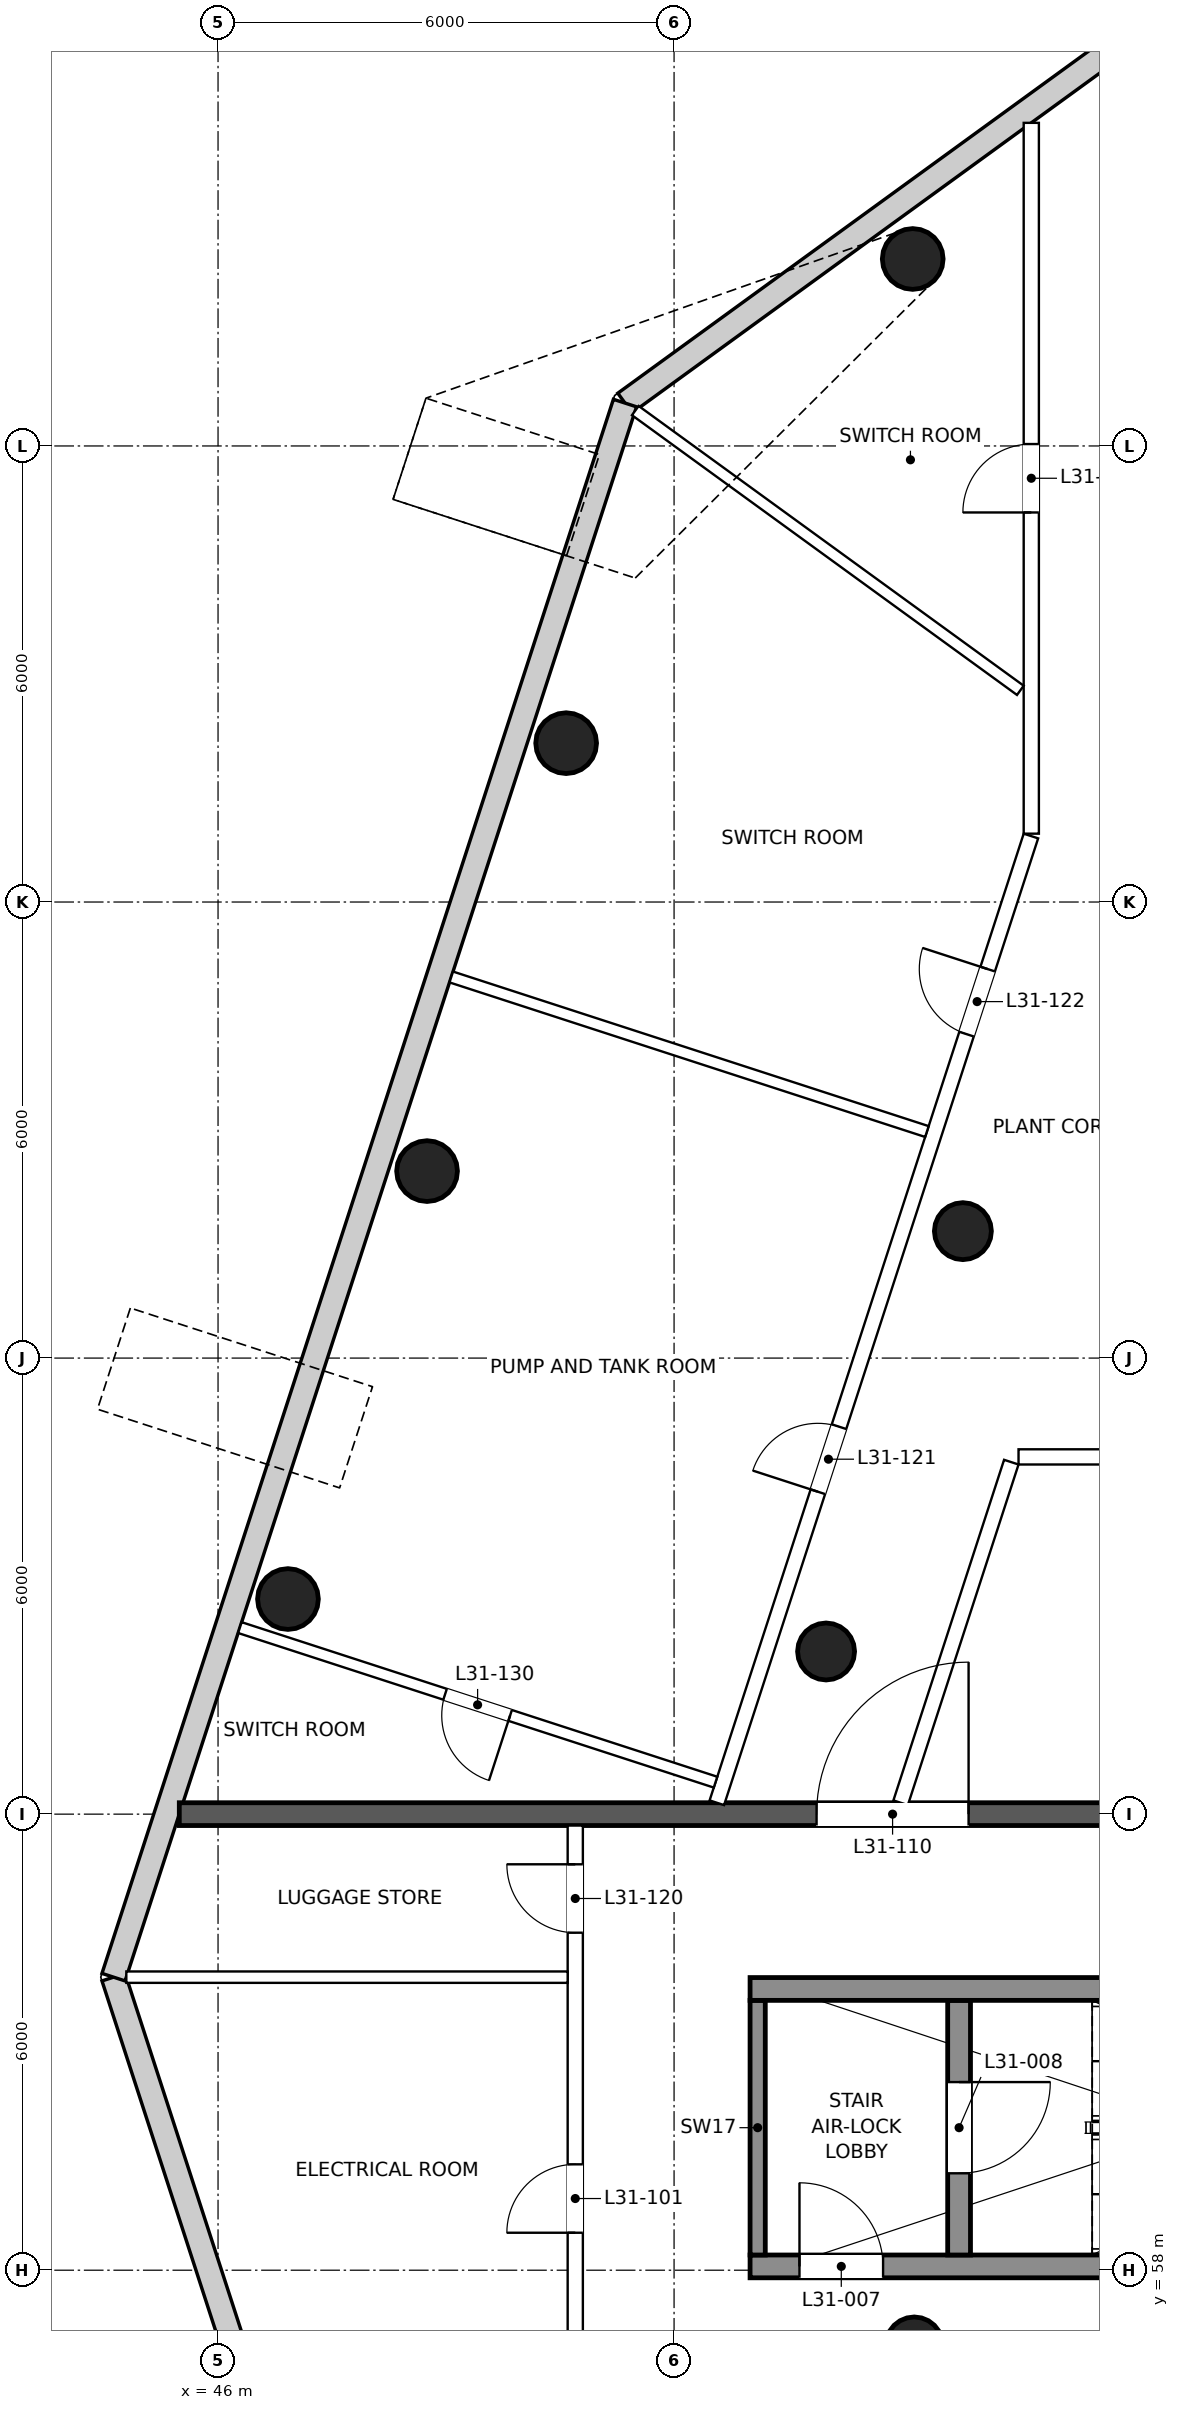
"""IFC4 building model, lengths in metres.
Left out: names, types, materials, properties, quantities, classifications, styles, units other than length and angle.
Written with IfcOpenShell. Run it as: python <this file> out.ifc"""

import sys

from ifc_helpers import new_model, si_unit, direction, frame, frame_2d, origin, origin_2d, place, context, subcontext, project, spatial, rectangle, circle, extrude, element, fill, save


model = new_model("IFC4")
c1 = context("Model", 3, precision=1e-05, world=origin(), true_north=direction((0.0, 1.0)))
c2 = subcontext(c1, "Body", "Model", "MODEL_VIEW")
j1 = project(units=[si_unit("LENGTHUNIT", "METRE"), si_unit("PLANEANGLEUNIT", "RADIAN")], contexts=[c1])
p1 = place(None, origin())
s1 = spatial("IfcSite", under=j1, at=p1, CompositionType="ELEMENT")
p2 = place(p1, origin())
s2 = spatial("IfcBuilding", under=s1, at=p2, CompositionType="ELEMENT")
p3 = place(p2, frame((0.0, 0.0, 137.6)))
s3 = spatial("IfcBuildingStorey", under=s2, at=p3, CompositionType="ELEMENT", Elevation=137.6)
for number, where, z_axis, x_axis in (
    (1, (55.14, 84.46, 0.0), (0.0, 0.0, 1.0), (1.0, 0.0, 0.0)),
    (2, (50.58, 78.09, 0.0), (0.0, 0.0, 1.0), (1.0, 0.0, 0.0)),
    (3, (48.75, 72.46, 0.0), (0.0, 0.0, 1.0), (1.0, 0.0, 0.0)),
    (4, (46.92, 66.83, 0.0), (0.0, 0.0, 1.0), (1.0, 0.0, 0.0)),
):
    element("IfcColumn", number, at=place(p3, frame(where, z_axis=z_axis, x_axis=x_axis)), inside=s3, PredefinedType="COLUMN", context=c2, shape_type="SweptSolid", body=[
        extrude(circle(Radius=0.4, at=origin_2d()), origin(), (0.0, 0.0, 1.0), 5.0),
    ])
for number, where, z_axis, x_axis in (
    (5, (55.16, 57.01, 0.0), (0.0, 0.0, 1.0), (1.0, 0.0, 0.0)),
    (6, (55.8, 71.67, 0.0), (0.0, 0.0, 1.0), (1.0, 0.0, 0.0)),
    (7, (54.0, 66.14, 0.0), (0.0, 0.0, 1.0), (1.0, 0.0, 0.0)),
):
    element("IfcColumn", number, at=place(p3, frame(where, z_axis=z_axis, x_axis=x_axis)), inside=s3, PredefinedType="COLUMN", context=c2, shape_type="SweptSolid", body=[
        extrude(circle(Radius=0.375, at=origin_2d()), origin(), (0.0, 0.0, 1.0), 5.0),
    ])
p4 = place(p3, frame((44.625, 61.855, 0.0), z_axis=(0.0, 0.0, 1.0), x_axis=(0.309020152218, -0.951055490244, 0.0)))
e8 = element("IfcWall", 8, at=p4, inside=s3, PredefinedType="SOLIDWALL", context=c2, shape_type="SweptSolid", body=[
    extrude(rectangle(XDim=8.709, YDim=0.32, at=frame_2d((4.355, 0.0))), origin(), (0.0, 0.0, 1.0), 4.6),
])
p5 = place(p3, frame((58.615, 87.84, 0.0), z_axis=(0.0, 0.0, 1.0), x_axis=(-0.809005369707, -0.587801251942, 0.0)))
e9 = element("IfcWall", 9, at=p5, inside=s3, PredefinedType="SOLIDWALL", context=c2, shape_type="SweptSolid", body=[
    extrude(rectangle(XDim=8.975, YDim=0.32, at=frame_2d((4.488, 0.0))), origin(), (0.0, 0.0, 1.0), 4.6),
])
p6 = place(p3, frame((51.354, 82.564, 0.0), z_axis=(0.0, 0.0, 1.0), x_axis=(-0.309023959084, -0.951054253296, 0.0)))
e10 = element("IfcWall", 10, at=p6, inside=s3, PredefinedType="SOLIDWALL", context=c2, shape_type="SweptSolid", body=[
    extrude(rectangle(XDim=21.775, YDim=0.32, at=frame_2d((10.887, 0.0))), origin(), (0.0, 0.0, 1.0), 4.6),
])
p7 = place(p3, frame((53.0, 58.05, 0.0), z_axis=(0.0, 0.0, 1.0), x_axis=(1.0, 0.0, 0.0)))
e11 = element("IfcWall", 11, at=p7, inside=s3, PredefinedType="SHEAR", context=c2, shape_type="SweptSolid", body=[
    extrude(rectangle(XDim=11.9, YDim=0.3, at=frame_2d((5.95, 0.0))), origin(), (0.0, 0.0, 1.0), 5.0),
])
p8 = place(p7, frame((0.65, 0.0, 0.0)))
e12 = element("IfcOpeningElement", 12, at=p8, cuts=e11, PredefinedType="OPENING", context=c2, shape_type="SweptSolid", body=[
    extrude(rectangle(XDim=1.1, YDim=2.1, at=frame_2d((0.55, 1.05))), frame((0.0, 0.16, 0.0), z_axis=(0.0, -1.0, 0.0), x_axis=(1.0, 0.0, 0.0)), (0.0, 0.0, 1.0), 0.32),
])
p9 = place(p3, frame((53.1, 58.2, 0.0), z_axis=(0.0, 0.0, 1.0), x_axis=(0.0, 1.0, 0.0)))
e13 = element("IfcWall", 13, at=p9, inside=s3, PredefinedType="SHEAR", context=c2, shape_type="SweptSolid", body=[
    extrude(rectangle(XDim=3.35, YDim=0.2, at=frame_2d((1.675, 0.0))), origin(), (0.0, 0.0, 1.0), 5.0),
])
p10 = place(p3, frame((55.75, 58.2, 0.0), z_axis=(0.0, 0.0, 1.0), x_axis=(0.0, 1.0, 0.0)))
e14 = element("IfcWall", 14, at=p10, inside=s3, PredefinedType="SHEAR", context=c2, shape_type="SweptSolid", body=[
    extrude(rectangle(XDim=3.35, YDim=0.3, at=frame_2d((1.675, 0.0))), origin(), (0.0, 0.0, 1.0), 5.0),
])
p11 = place(p10, frame((1.075, 0.0, 0.0)))
e15 = element("IfcOpeningElement", 15, at=p11, cuts=e14, PredefinedType="OPENING", context=c2, shape_type="SweptSolid", body=[
    extrude(rectangle(XDim=1.2, YDim=2.1, at=frame_2d((0.6, 1.05))), frame((0.0, 0.16, 0.0), z_axis=(0.0, -1.0, 0.0), x_axis=(1.0, 0.0, 0.0)), (0.0, 0.0, 1.0), 0.32),
])
p12 = place(p3, frame((53.0, 61.7, 0.0), z_axis=(0.0, 0.0, 1.0), x_axis=(1.0, 0.0, 0.0)))
e16 = element("IfcWall", 16, at=p12, inside=s3, PredefinedType="SHEAR", context=c2, shape_type="SweptSolid", body=[
    extrude(rectangle(XDim=11.9, YDim=0.3, at=frame_2d((5.95, 0.0))), origin(), (0.0, 0.0, 1.0), 5.0),
])
p13 = place(p3, frame((45.49, 64.0, 0.0), z_axis=(0.0, 0.0, 1.0), x_axis=(1.0, 0.0, 0.0)))
e17 = element("IfcWall", 17, at=p13, inside=s3, PredefinedType="PARTITIONING", context=c2, shape_type="SweptSolid", body=[
    extrude(rectangle(XDim=49.02, YDim=0.3, at=frame_2d((24.51, 0.0))), origin(), (0.0, 0.0, 1.0), 3.9),
])
p14 = place(p13, frame((8.385, 0.0, 0.0)))
e18 = element("IfcOpeningElement", 18, at=p14, cuts=e17, PredefinedType="OPENING", context=c2, shape_type="SweptSolid", body=[
    extrude(rectangle(XDim=2.0, YDim=2.1, at=frame_2d((1.0, 1.05))), frame((0.0, 0.16, 0.0), z_axis=(0.0, -1.0, 0.0), x_axis=(1.0, 0.0, 0.0)), (0.0, 0.0, 1.0), 0.32),
])
p15 = place(p13, frame((16.535, 0.0, 0.0)))
e19 = element("IfcOpeningElement", 19, at=p15, cuts=e17, PredefinedType="OPENING", context=c2, shape_type="SweptSolid", body=[
    extrude(rectangle(XDim=2.0, YDim=2.1, at=frame_2d((1.0, 1.05))), frame((0.0, 0.16, 0.0), z_axis=(0.0, -1.0, 0.0), x_axis=(1.0, 0.0, 0.0)), (0.0, 0.0, 1.0), 0.32),
])
p16 = place(p13, frame((23.91, 0.0, 0.0)))
e20 = element("IfcOpeningElement", 20, at=p16, cuts=e17, PredefinedType="OPENING", context=c2, shape_type="SweptSolid", body=[
    extrude(rectangle(XDim=1.2, YDim=2.1, at=frame_2d((0.6, 1.05))), frame((0.0, 0.16, 0.0), z_axis=(0.0, -1.0, 0.0), x_axis=(1.0, 0.0, 0.0)), (0.0, 0.0, 1.0), 0.32),
])
p17 = place(p13, frame((30.435, 0.0, 0.0)))
e21 = element("IfcOpeningElement", 21, at=p17, cuts=e17, PredefinedType="OPENING", context=c2, shape_type="SweptSolid", body=[
    extrude(rectangle(XDim=2.0, YDim=2.1, at=frame_2d((1.0, 1.05))), frame((0.0, 0.16, 0.0), z_axis=(0.0, -1.0, 0.0), x_axis=(1.0, 0.0, 0.0)), (0.0, 0.0, 1.0), 0.32),
])
p18 = place(p13, frame((38.635, 0.0, 0.0)))
e22 = element("IfcOpeningElement", 22, at=p18, cuts=e17, PredefinedType="OPENING", context=c2, shape_type="SweptSolid", body=[
    extrude(rectangle(XDim=2.0, YDim=2.1, at=frame_2d((1.0, 1.05))), frame((0.0, 0.16, 0.0), z_axis=(0.0, -1.0, 0.0), x_axis=(1.0, 0.0, 0.0)), (0.0, 0.0, 1.0), 0.32),
])
p19 = place(p3, frame((52.563, 64.15, 0.0), z_axis=(0.0, 0.0, 1.0), x_axis=(0.309005574406, 0.951060226792, 0.0)))
e23 = element("IfcWall", 23, at=p19, inside=s3, PredefinedType="PARTITIONING", context=c2, shape_type="SweptSolid", body=[
    extrude(rectangle(XDim=13.373, YDim=0.2, at=frame_2d((6.687, 0.0))), origin(), (0.0, 0.0, 1.0), 4.6),
])
p20 = place(p19, frame((4.302, 0.0, 0.0)))
e24 = element("IfcOpeningElement", 24, at=p20, cuts=e23, PredefinedType="OPENING", context=c2, shape_type="SweptSolid", body=[
    extrude(rectangle(XDim=0.9, YDim=2.1, at=frame_2d((0.45, 1.05))), frame((0.0, 0.11, 0.0), z_axis=(0.0, -1.0, 0.0), x_axis=(1.0, 0.0, 0.0)), (0.0, 0.0, 1.0), 0.22),
])
p21 = place(p19, frame((10.632, 0.0, 0.0)))
e25 = element("IfcOpeningElement", 25, at=p21, cuts=e23, PredefinedType="OPENING", context=c2, shape_type="SweptSolid", body=[
    extrude(rectangle(XDim=0.9, YDim=2.1, at=frame_2d((0.45, 1.05))), frame((0.0, 0.11, 0.0), z_axis=(0.0, -1.0, 0.0), x_axis=(1.0, 0.0, 0.0)), (0.0, 0.0, 1.0), 0.22),
])
p22 = place(p3, frame((56.7, 76.899, 0.0), z_axis=(0.0, 0.0, 1.0), x_axis=(0.0, 1.0, 0.0)))
e26 = element("IfcWall", 26, at=p22, inside=s3, PredefinedType="PARTITIONING", context=c2, shape_type="SweptSolid", body=[
    extrude(rectangle(XDim=9.352, YDim=0.2, at=frame_2d((4.676, 0.0))), origin(), (0.0, 0.0, 1.0), 4.15),
])
p23 = place(p22, frame((4.226, 0.0, 0.0)))
e27 = element("IfcOpeningElement", 27, at=p23, cuts=e26, PredefinedType="OPENING", context=c2, shape_type="SweptSolid", body=[
    extrude(rectangle(XDim=0.9, YDim=2.1, at=frame_2d((0.45, 1.05))), frame((0.0, 0.11, 0.0), z_axis=(0.0, -1.0, 0.0), x_axis=(1.0, 0.0, 0.0)), (0.0, 0.0, 1.0), 0.22),
])
p24 = place(p3, frame((50.7, 55.7, 0.0), z_axis=(0.0, 0.0, 1.0), x_axis=(0.0, 1.0, 0.0)))
e28 = element("IfcWall", 28, at=p24, inside=s3, PredefinedType="PARTITIONING", context=c2, shape_type="SweptSolid", body=[
    extrude(rectangle(XDim=8.15, YDim=0.2, at=frame_2d((4.075, 0.0))), origin(), (0.0, 0.0, 1.0), 4.6),
])
p25 = place(p24, frame((2.793, 0.0, 0.0)))
e29 = element("IfcOpeningElement", 29, at=p25, cuts=e28, PredefinedType="OPENING", context=c2, shape_type="SweptSolid", body=[
    extrude(rectangle(XDim=0.9, YDim=2.1, at=frame_2d((0.45, 1.05))), frame((0.0, 0.11, 0.0), z_axis=(0.0, -1.0, 0.0), x_axis=(1.0, 0.0, 0.0)), (0.0, 0.0, 1.0), 0.22),
])
p26 = place(p24, frame((6.74, 0.0, 0.0)))
e30 = element("IfcOpeningElement", 30, at=p26, cuts=e28, PredefinedType="OPENING", context=c2, shape_type="SweptSolid", body=[
    extrude(rectangle(XDim=0.9, YDim=2.1, at=frame_2d((0.45, 1.05))), frame((0.0, 0.11, 0.0), z_axis=(0.0, -1.0, 0.0), x_axis=(1.0, 0.0, 0.0)), (0.0, 0.0, 1.0), 0.22),
])
p27 = place(p3, frame((68.75, 68.7, 0.0), z_axis=(0.0, 0.0, 1.0), x_axis=(-1.0, 0.0, 0.0)))
e31 = element("IfcWall", 31, at=p27, inside=s3, PredefinedType="PARTITIONING", context=c2, shape_type="SweptSolid", body=[
    extrude(rectangle(XDim=12.218, YDim=0.2, at=frame_2d((6.109, 0.0))), origin(), (0.0, 0.0, 1.0), 4.6),
])
p28 = place(p27, frame((2.468, 0.0, 0.0)))
e32 = element("IfcOpeningElement", 32, at=p28, cuts=e31, PredefinedType="OPENING", context=c2, shape_type="SweptSolid", body=[
    extrude(rectangle(XDim=0.9, YDim=2.1, at=frame_2d((0.45, 1.05))), frame((0.0, 0.11, 0.0), z_axis=(0.0, -1.0, 0.0), x_axis=(1.0, 0.0, 0.0)), (0.0, 0.0, 1.0), 0.22),
])
p29 = place(p27, frame((8.467, 0.0, 0.0)))
e33 = element("IfcOpeningElement", 33, at=p29, cuts=e31, PredefinedType="OPENING", context=c2, shape_type="SweptSolid", body=[
    extrude(rectangle(XDim=0.9, YDim=2.1, at=frame_2d((0.45, 1.05))), frame((0.0, 0.11, 0.0), z_axis=(0.0, -1.0, 0.0), x_axis=(1.0, 0.0, 0.0)), (0.0, 0.0, 1.0), 0.22),
])
p30 = place(p3, frame((56.437, 68.631, 0.0), z_axis=(0.0, 0.0, 1.0), x_axis=(-0.309036861841, -0.951050060735, 0.0)))
e34 = element("IfcWall", 34, at=p30, inside=s3, PredefinedType="PARTITIONING", context=c2, shape_type="SweptSolid", body=[
    extrude(rectangle(XDim=4.712, YDim=0.2, at=frame_2d((2.356, 0.0))), origin(), (0.0, 0.0, 1.0), 4.6),
])
p31 = place(p3, frame((51.49, 82.466, 0.0), z_axis=(0.0, 0.0, 1.0), x_axis=(0.809012497549, -0.587791441593, 0.0)))
e35 = element("IfcWall", 35, at=p31, inside=s3, PredefinedType="PARTITIONING", context=c2, shape_type="SweptSolid", body=[
    extrude(rectangle(XDim=6.262, YDim=0.15, at=frame_2d((3.131, 0.0))), origin(), (0.0, 0.0, 1.0), 4.15),
])
p32 = place(p3, frame((44.793, 61.855, 0.0), z_axis=(0.0, 0.0, 1.0), x_axis=(1.0, 0.0, 0.0)))
e36 = element("IfcWall", 36, at=p32, inside=s3, PredefinedType="PARTITIONING", context=c2, shape_type="SweptSolid", body=[
    extrude(rectangle(XDim=5.807, YDim=0.15, at=frame_2d((2.903, 0.0))), origin(), (0.0, 0.0, 1.0), 3.9),
])
p33 = place(p3, frame((49.069, 75.014, 0.0), z_axis=(0.0, 0.0, 1.0), x_axis=(0.95105288048, -0.309028184041, 0.0)))
e37 = element("IfcWall", 37, at=p33, inside=s3, PredefinedType="PARTITIONING", context=c2, shape_type="SweptSolid", body=[
    extrude(rectangle(XDim=6.58, YDim=0.15, at=frame_2d((3.29, 0.0))), origin(), (0.0, 0.0, 1.0), 4.15),
])
p34 = place(p3, frame((46.288, 66.454, 0.0), z_axis=(0.0, 0.0, 1.0), x_axis=(0.951060241863, -0.309005528021, 0.0)))
e38 = element("IfcWall", 38, at=p34, inside=s3, PredefinedType="PARTITIONING", context=c2, shape_type="SweptSolid", body=[
    extrude(rectangle(XDim=6.58, YDim=0.15, at=frame_2d((3.29, 0.0))), origin(), (0.0, 0.0, 1.0), 3.9),
])
p35 = place(p34, frame((2.838, 0.0, 0.0)))
e39 = element("IfcOpeningElement", 39, at=p35, cuts=e38, PredefinedType="OPENING", context=c2, shape_type="SweptSolid", body=[
    extrude(rectangle(XDim=0.9, YDim=2.1, at=frame_2d((0.45, 1.05))), frame((0.0, 0.085, 0.0), z_axis=(0.0, -1.0, 0.0), x_axis=(1.0, 0.0, 0.0)), (0.0, 0.0, 1.0), 0.17),
])
p36 = place(p8, origin())
e40 = element("IfcDoor", 40, at=p36, inside=s3, OperationType="SINGLE_SWING_LEFT", PredefinedType="DOOR", context=c2, shape_type="SweptSolid", body=[
    extrude(rectangle(XDim=1.1, YDim=2.1, at=frame_2d((0.55, 1.05))), frame((0.0, 0.025, 0.0), z_axis=(0.0, -1.0, 0.0), x_axis=(1.0, 0.0, 0.0)), (0.0, 0.0, 1.0), 0.05),
])
fill(e12, e40)
p37 = place(p11, frame((1.2, 0.0, 0.0), z_axis=(0.0, 0.0, 1.0), x_axis=(-1.0, 0.0, 0.0)))
e41 = element("IfcDoor", 41, at=p37, inside=s3, OperationType="SINGLE_SWING_LEFT", PredefinedType="DOOR", context=c2, shape_type="SweptSolid", body=[
    extrude(rectangle(XDim=1.2, YDim=2.1, at=frame_2d((0.6, 1.05))), frame((0.0, 0.025, 0.0), z_axis=(0.0, -1.0, 0.0), x_axis=(1.0, 0.0, 0.0)), (0.0, 0.0, 1.0), 0.05),
])
fill(e15, e41)
p38 = place(p25, origin())
e42 = element("IfcDoor", 42, at=p38, inside=s3, OperationType="SINGLE_SWING_LEFT", PredefinedType="DOOR", context=c2, shape_type="SweptSolid", body=[
    extrude(rectangle(XDim=0.9, YDim=2.1, at=frame_2d((0.45, 1.05))), frame((0.0, 0.025, 0.0), z_axis=(0.0, -1.0, 0.0), x_axis=(1.0, 0.0, 0.0)), (0.0, 0.0, 1.0), 0.05),
])
fill(e29, e42)
p39 = place(p14, origin())
e43 = element("IfcDoor", 43, at=p39, inside=s3, OperationType="DOUBLE_DOOR_SINGLE_SWING", PredefinedType="DOOR", context=c2, shape_type="SweptSolid", body=[
    extrude(rectangle(XDim=2.0, YDim=2.1, at=frame_2d((1.0, 1.05))), frame((0.0, 0.025, 0.0), z_axis=(0.0, -1.0, 0.0), x_axis=(1.0, 0.0, 0.0)), (0.0, 0.0, 1.0), 0.05),
])
fill(e18, e43)
p40 = place(p26, origin())
e44 = element("IfcDoor", 44, at=p40, inside=s3, OperationType="SINGLE_SWING_RIGHT", PredefinedType="DOOR", context=c2, shape_type="SweptSolid", body=[
    extrude(rectangle(XDim=0.9, YDim=2.1, at=frame_2d((0.45, 1.05))), frame((0.0, 0.025, 0.0), z_axis=(0.0, -1.0, 0.0), x_axis=(1.0, 0.0, 0.0)), (0.0, 0.0, 1.0), 0.05),
])
fill(e30, e44)
p41 = place(p20, origin())
e45 = element("IfcDoor", 45, at=p41, inside=s3, OperationType="SINGLE_SWING_LEFT", PredefinedType="DOOR", context=c2, shape_type="SweptSolid", body=[
    extrude(rectangle(XDim=0.9, YDim=2.1, at=frame_2d((0.45, 1.05))), frame((0.0, 0.025, 0.0), z_axis=(0.0, -1.0, 0.0), x_axis=(1.0, 0.0, 0.0)), (0.0, 0.0, 1.0), 0.05),
])
fill(e24, e45)
p42 = place(p21, origin())
e46 = element("IfcDoor", 46, at=p42, inside=s3, OperationType="SINGLE_SWING_RIGHT", PredefinedType="DOOR", context=c2, shape_type="SweptSolid", body=[
    extrude(rectangle(XDim=0.9, YDim=2.1, at=frame_2d((0.45, 1.05))), frame((0.0, 0.025, 0.0), z_axis=(0.0, -1.0, 0.0), x_axis=(1.0, 0.0, 0.0)), (0.0, 0.0, 1.0), 0.05),
])
fill(e25, e46)
p43 = place(p23, origin())
e47 = element("IfcDoor", 47, at=p43, inside=s3, OperationType="SINGLE_SWING_LEFT", PredefinedType="DOOR", context=c2, shape_type="SweptSolid", body=[
    extrude(rectangle(XDim=0.9, YDim=2.1, at=frame_2d((0.45, 1.05))), frame((0.0, 0.025, 0.0), z_axis=(0.0, -1.0, 0.0), x_axis=(1.0, 0.0, 0.0)), (0.0, 0.0, 1.0), 0.05),
])
fill(e27, e47)
p44 = place(p35, frame((0.9, 0.0, 0.0), z_axis=(0.0, 0.0, 1.0), x_axis=(-1.0, 0.0, 0.0)))
e48 = element("IfcDoor", 48, at=p44, inside=s3, OperationType="SINGLE_SWING_LEFT", PredefinedType="DOOR", context=c2, shape_type="SweptSolid", body=[
    extrude(rectangle(XDim=0.9, YDim=2.1, at=frame_2d((0.45, 1.05))), frame((0.0, 0.025, 0.0), z_axis=(0.0, -1.0, 0.0), x_axis=(1.0, 0.0, 0.0)), (0.0, 0.0, 1.0), 0.05),
])
fill(e39, e48)
save(model, sys.argv[1])
